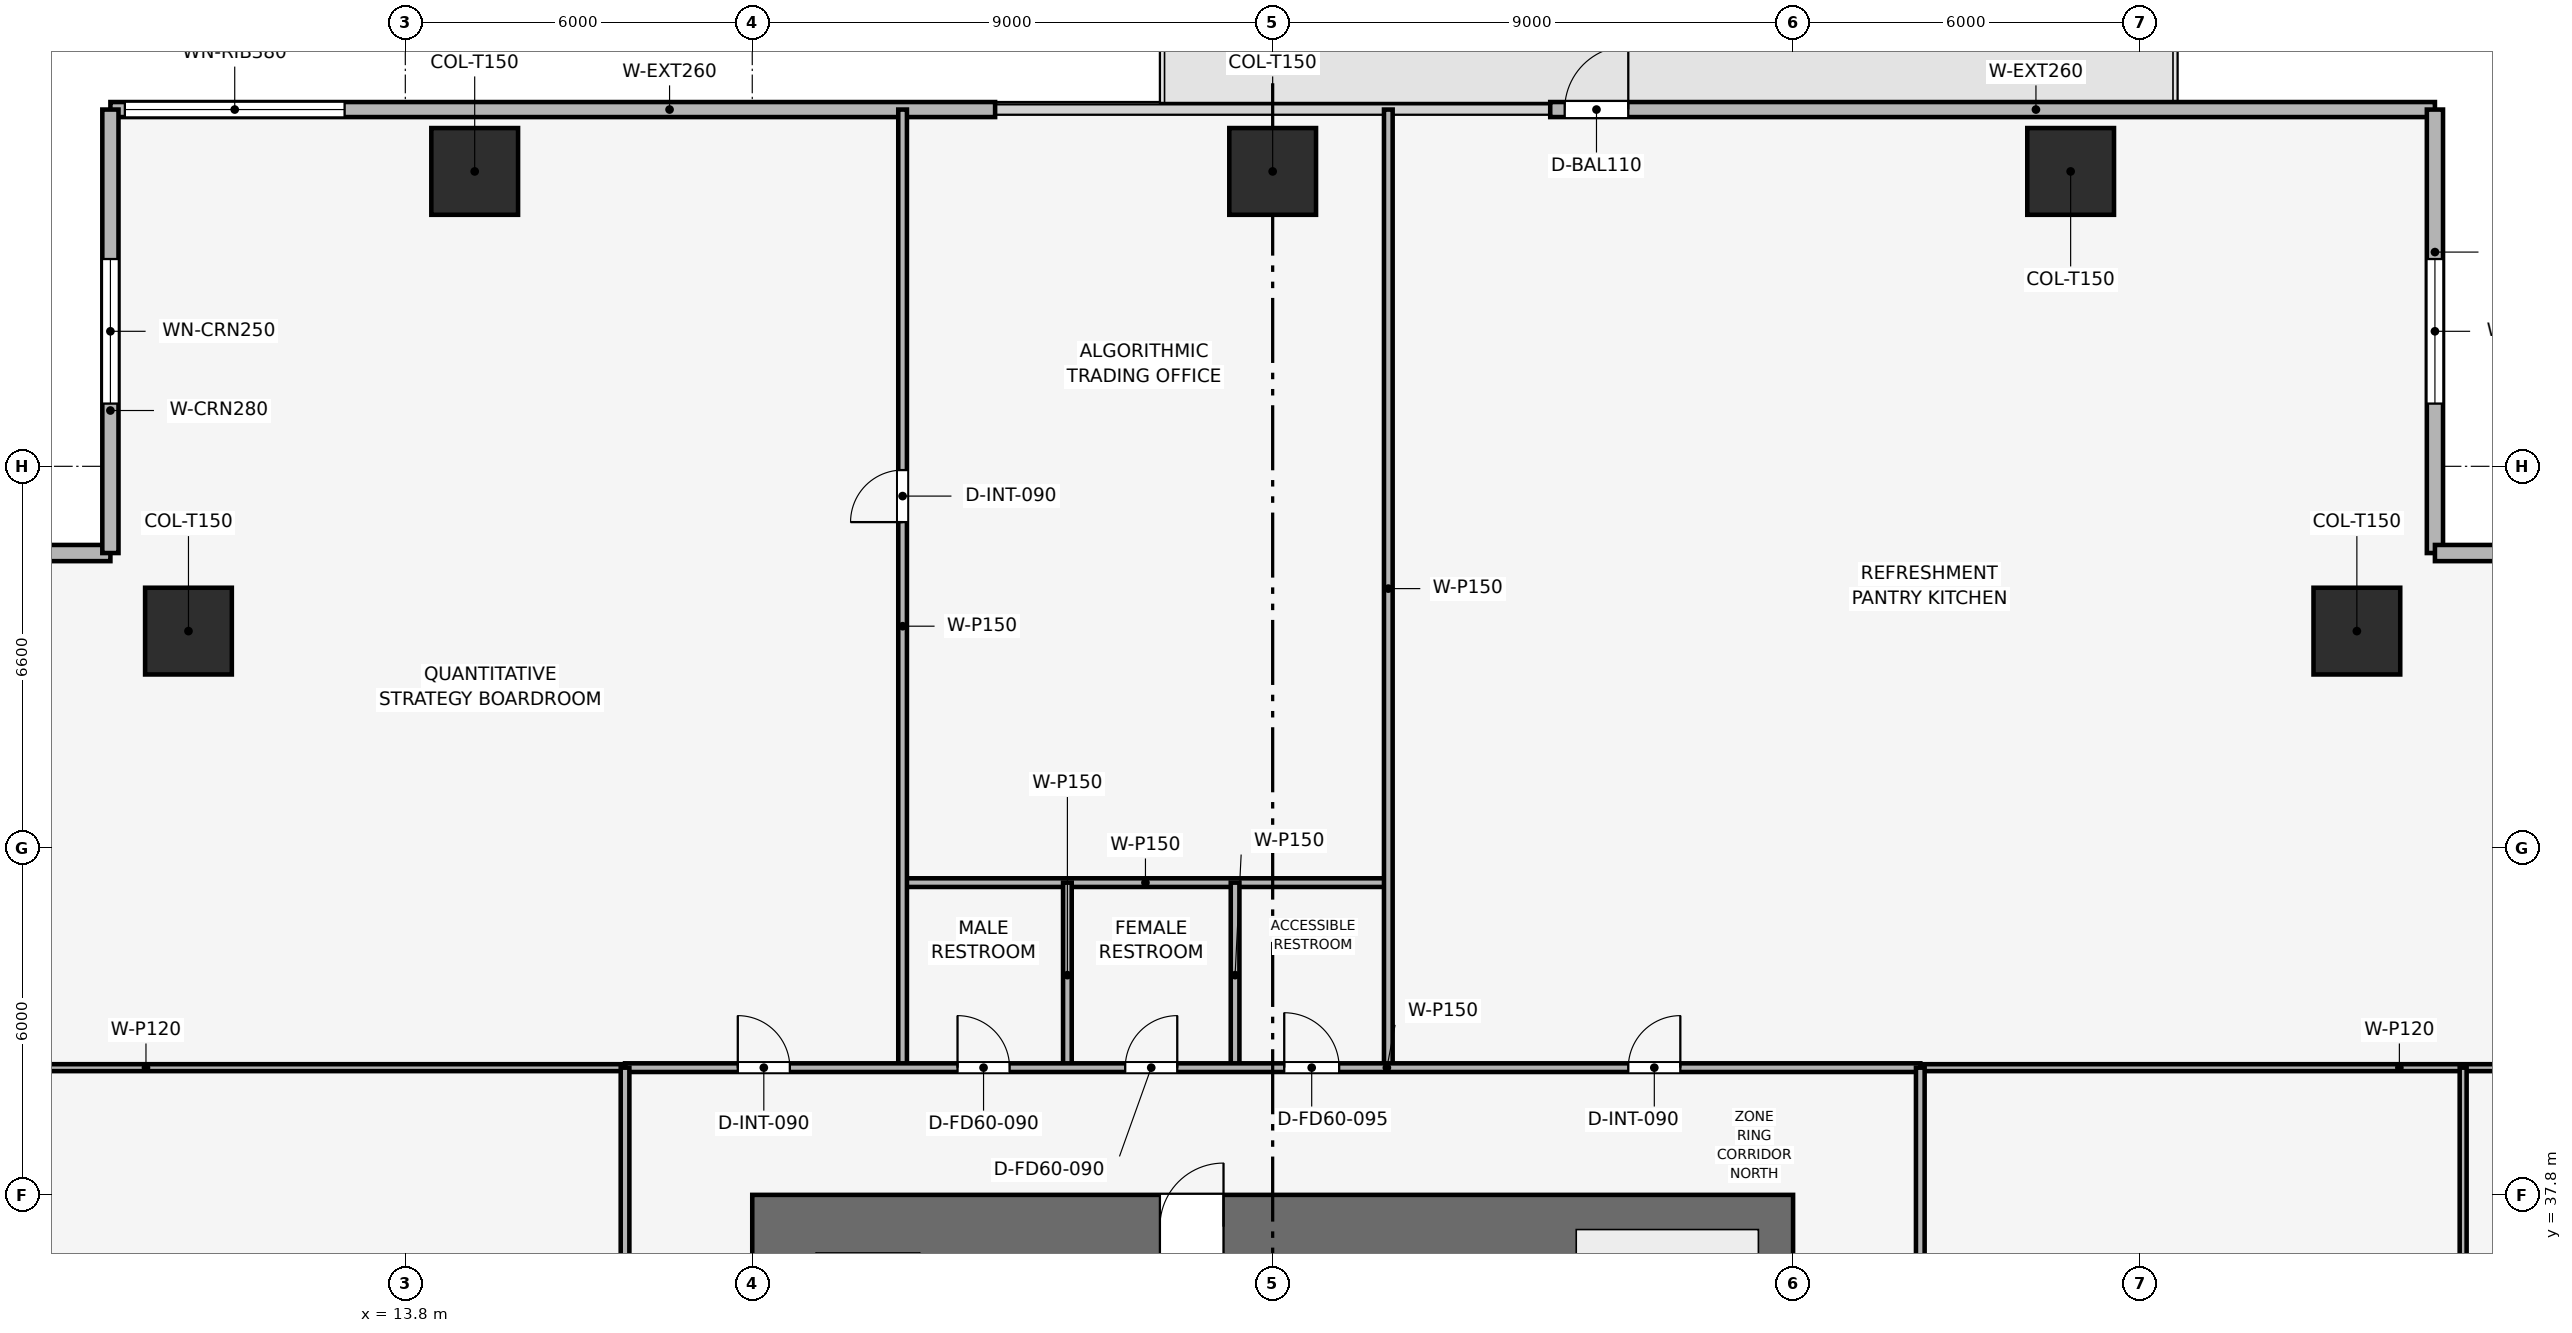
"""IFC4 building model, lengths in metres.
Left out: names, types, materials, properties, quantities, classifications, styles, units other than length and angle.
Written with IfcOpenShell. Run it as: python <this file> out.ifc"""

import sys

from ifc_helpers import new_model, si_unit, direction, frame, frame_2d, origin, origin_2d, place, context, subcontext, project, spatial, rectangle, extrude, element, fill, save


model = new_model("IFC4")
c1 = context("Model", 3, precision=1e-05, world=origin(), true_north=direction((0.0, 1.0)))
c2 = subcontext(c1, "Body", "Model", "MODEL_VIEW")
j1 = project(units=[si_unit("LENGTHUNIT", "METRE"), si_unit("PLANEANGLEUNIT", "RADIAN")], contexts=[c1])
p1 = place(None, origin())
s1 = spatial("IfcSite", under=j1, at=p1, CompositionType="ELEMENT")
p2 = place(p1, origin())
s2 = spatial("IfcBuilding", under=s1, at=p2, CompositionType="ELEMENT")
p3 = place(p2, frame((0.0, 0.0, 41.7)))
s3 = spatial("IfcBuildingStorey", under=s2, at=p3, CompositionType="ELEMENT", Elevation=41.7)
p4 = place(p3, frame((19.8, 37.25, 0.0), z_axis=(0.0, 0.0, 1.0), x_axis=(1.0, 0.0, 0.0)))
e1 = element("IfcWall", 1, at=p4, inside=s3, PredefinedType="SHEAR", context=c2, shape_type="SweptSolid", body=[
    extrude(rectangle(XDim=18.0, YDim=1.1, at=frame_2d((9.0, 0.0))), origin(), (0.0, 0.0, 1.0), 3.9),
])
p5 = place(p4, frame((7.05, 0.0, 0.0)))
e2 = element("IfcOpeningElement", 2, at=p5, cuts=e1, PredefinedType="OPENING", context=c2, shape_type="SweptSolid", body=[
    extrude(rectangle(XDim=1.1, YDim=2.15, at=frame_2d((0.55, 1.075))), frame((0.0, 0.56, 0.0), z_axis=(0.0, -1.0, 0.0), x_axis=(1.0, 0.0, 0.0)), (0.0, 0.0, 1.0), 1.12),
])
for number, where, z_axis, x_axis in (
    (3, (42.6, 55.5, 0.003), (0.0, 0.0, 1.0), (1.0, 0.0, 0.0)),
    (4, (28.8, 55.5, 0.003), (0.0, 0.0, 1.0), (1.0, 0.0, 0.0)),
    (5, (15.0, 55.5, 0.003), (0.0, 0.0, 1.0), (1.0, 0.0, 0.0)),
    (6, (47.55, 47.55, 0.003), (0.0, 0.0, 1.0), (1.0, 0.0, 0.0)),
    (7, (10.05, 47.55, 0.003), (0.0, 0.0, 1.0), (1.0, 0.0, 0.0)),
):
    element("IfcColumn", number, at=place(p3, frame(where, z_axis=z_axis, x_axis=x_axis)), inside=s3, PredefinedType="COLUMN", context=c2, shape_type="SweptSolid", body=[
        extrude(rectangle(XDim=1.5, YDim=1.5, at=origin_2d()), origin(), (0.0, 0.0, 1.0), 3.644),
    ])
p6 = place(p3, frame((8.7, 56.57, 0.0), z_axis=(0.0, 0.0, 1.0), x_axis=(1.0, 0.0, 0.0)))
e8 = element("IfcWall", 8, at=p6, inside=s3, PredefinedType="SOLIDWALL", context=c2, shape_type="SweptSolid", body=[
    extrude(rectangle(XDim=15.3, YDim=0.26, at=frame_2d((7.65, 0.0))), origin(), (0.0, 0.0, 1.0), 3.65),
])
p7 = place(p6, frame((0.25, 0.0, 0.9)))
e9 = element("IfcOpeningElement", 9, at=p7, cuts=e8, PredefinedType="OPENING", context=c2, shape_type="SweptSolid", body=[
    extrude(rectangle(XDim=3.8, YDim=1.9, at=frame_2d((1.9, 0.95))), frame((0.0, 0.14, 0.0), z_axis=(0.0, -1.0, 0.0), x_axis=(1.0, 0.0, 0.0)), (0.0, 0.0, 1.0), 0.28),
])
p8 = place(p3, frame((33.6, 56.57, 0.0), z_axis=(0.0, 0.0, 1.0), x_axis=(1.0, 0.0, 0.0)))
e10 = element("IfcWall", 10, at=p8, inside=s3, PredefinedType="SOLIDWALL", context=c2, shape_type="SweptSolid", body=[
    extrude(rectangle(XDim=15.3, YDim=0.26, at=frame_2d((7.65, 0.0))), origin(), (0.0, 0.0, 1.0), 3.65),
])
p9 = place(p8, frame((0.25, 0.0, 0.0)))
e11 = element("IfcOpeningElement", 11, at=p9, cuts=e10, PredefinedType="OPENING", context=c2, shape_type="SweptSolid", body=[
    extrude(rectangle(XDim=1.1, YDim=2.2, at=frame_2d((0.55, 1.1))), frame((0.0, 0.14, 0.0), z_axis=(0.0, -1.0, 0.0), x_axis=(1.0, 0.0, 0.0)), (0.0, 0.0, 1.0), 0.28),
])
p10 = place(p3, frame((1.03, 48.9, 0.0), z_axis=(0.0, 0.0, 1.0), x_axis=(1.0, 0.0, 0.0)))
e12 = element("IfcWall", 12, at=p10, inside=s3, PredefinedType="SOLIDWALL", context=c2, shape_type="SweptSolid", body=[
    extrude(rectangle(XDim=7.67, YDim=0.28, at=frame_2d((3.835, 0.0))), origin(), (0.0, 0.0, 1.0), 3.65),
])
p11 = place(p10, frame((2.585, 0.0, 0.9)))
e13 = element("IfcOpeningElement", 13, at=p11, cuts=e12, PredefinedType="OPENING", context=c2, shape_type="SweptSolid", body=[
    extrude(rectangle(XDim=2.5, YDim=1.9, at=frame_2d((1.25, 0.95))), frame((0.0, 0.15, 0.0), z_axis=(0.0, -1.0, 0.0), x_axis=(1.0, 0.0, 0.0)), (0.0, 0.0, 1.0), 0.3),
])
p12 = place(p3, frame((8.7, 48.9, 0.0), z_axis=(0.0, 0.0, 1.0), x_axis=(0.0, 1.0, 0.0)))
e14 = element("IfcWall", 14, at=p12, inside=s3, PredefinedType="SOLIDWALL", context=c2, shape_type="SweptSolid", body=[
    extrude(rectangle(XDim=7.67, YDim=0.28, at=frame_2d((3.835, 0.0))), origin(), (0.0, 0.0, 1.0), 3.65),
])
p13 = place(p12, frame((2.585, 0.0, 0.9)))
e15 = element("IfcOpeningElement", 15, at=p13, cuts=e14, PredefinedType="OPENING", context=c2, shape_type="SweptSolid", body=[
    extrude(rectangle(XDim=2.5, YDim=1.9, at=frame_2d((1.25, 0.95))), frame((0.0, 0.15, 0.0), z_axis=(0.0, -1.0, 0.0), x_axis=(1.0, 0.0, 0.0)), (0.0, 0.0, 1.0), 0.3),
])
p14 = place(p3, frame((48.9, 56.57, 0.0), z_axis=(0.0, 0.0, 1.0), x_axis=(0.0, -1.0, 0.0)))
e16 = element("IfcWall", 16, at=p14, inside=s3, PredefinedType="SOLIDWALL", context=c2, shape_type="SweptSolid", body=[
    extrude(rectangle(XDim=7.67, YDim=0.28, at=frame_2d((3.835, 0.0))), origin(), (0.0, 0.0, 1.0), 3.65),
])
p15 = place(p14, frame((2.585, 0.0, 0.9)))
e17 = element("IfcOpeningElement", 17, at=p15, cuts=e16, PredefinedType="OPENING", context=c2, shape_type="SweptSolid", body=[
    extrude(rectangle(XDim=2.5, YDim=1.9, at=frame_2d((1.25, 0.95))), frame((0.0, 0.15, 0.0), z_axis=(0.0, -1.0, 0.0), x_axis=(1.0, 0.0, 0.0)), (0.0, 0.0, 1.0), 0.3),
])
p16 = place(p3, frame((48.9, 48.9, 0.0), z_axis=(0.0, 0.0, 1.0), x_axis=(1.0, 0.0, 0.0)))
e18 = element("IfcWall", 18, at=p16, inside=s3, PredefinedType="SOLIDWALL", context=c2, shape_type="SweptSolid", body=[
    extrude(rectangle(XDim=7.67, YDim=0.28, at=frame_2d((3.835, 0.0))), origin(), (0.0, 0.0, 1.0), 3.65),
])
p17 = place(p16, frame((2.585, 0.0, 0.9)))
e19 = element("IfcOpeningElement", 19, at=p17, cuts=e18, PredefinedType="OPENING", context=c2, shape_type="SweptSolid", body=[
    extrude(rectangle(XDim=2.5, YDim=1.9, at=frame_2d((1.25, 0.95))), frame((0.0, 0.15, 0.0), z_axis=(0.0, -1.0, 0.0), x_axis=(1.0, 0.0, 0.0)), (0.0, 0.0, 1.0), 0.3),
])
p18 = place(p3, frame((22.4, 43.2, 0.0), z_axis=(0.0, 0.0, 1.0), x_axis=(1.0, 0.0, 0.0)))
e20 = element("IfcWall", 20, at=p18, inside=s3, PredefinedType="PARTITIONING", context=c2, shape_type="SweptSolid", body=[
    extrude(rectangle(XDim=8.4, YDim=0.15, at=frame_2d((4.2, 0.0))), origin(), (0.0, 0.0, 1.0), 3.085),
])
p19 = place(p3, frame((22.4, 40.0, 0.0), z_axis=(0.0, 0.0, 1.0), x_axis=(0.0, 1.0, 0.0)))
e21 = element("IfcWall", 21, at=p19, inside=s3, PredefinedType="PARTITIONING", context=c2, shape_type="SweptSolid", body=[
    extrude(rectangle(XDim=16.57, YDim=0.15, at=frame_2d((8.285, 0.0))), origin(), (0.0, 0.0, 1.0), 2.935),
])
p20 = place(p19, frame((9.435, 0.0, 0.0)))
e22 = element("IfcOpeningElement", 22, at=p20, cuts=e21, PredefinedType="OPENING", context=c2, shape_type="SweptSolid", body=[
    extrude(rectangle(XDim=0.9, YDim=2.1, at=frame_2d((0.45, 1.05))), frame((0.0, 0.085, 0.0), z_axis=(0.0, -1.0, 0.0), x_axis=(1.0, 0.0, 0.0)), (0.0, 0.0, 1.0), 0.17),
])
p21 = place(p3, frame((30.8, 40.0, 0.0), z_axis=(0.0, 0.0, 1.0), x_axis=(0.0, 1.0, 0.0)))
e23 = element("IfcWall", 23, at=p21, inside=s3, PredefinedType="PARTITIONING", context=c2, shape_type="SweptSolid", body=[
    extrude(rectangle(XDim=16.57, YDim=0.15, at=frame_2d((8.285, 0.0))), origin(), (0.0, 0.0, 1.0), 2.935),
])
for number, where, z_axis, x_axis in (
    (24, (25.25, 40.0, 0.0), (0.0, 0.0, 1.0), (0.0, 1.0, 0.0)),
    (25, (28.15, 40.0, 0.0), (0.0, 0.0, 1.0), (0.0, 1.0, 0.0)),
):
    element("IfcWall", number, at=place(p3, frame(where, z_axis=z_axis, x_axis=x_axis)), inside=s3, PredefinedType="PARTITIONING", context=c2, shape_type="SweptSolid", body=[
        extrude(rectangle(XDim=3.2, YDim=0.15, at=frame_2d((1.6, 0.0))), origin(), (0.0, 0.0, 1.0), 3.65),
    ])
for number, where, z_axis, x_axis in (
    (26, (1.03, 40.0, 0.0), (0.0, 0.0, 1.0), (1.0, 0.0, 0.0)),
    (27, (40.0, 40.0, 0.0), (0.0, 0.0, 1.0), (1.0, 0.0, 0.0)),
):
    element("IfcWall", number, at=place(p3, frame(where, z_axis=z_axis, x_axis=x_axis)), inside=s3, PredefinedType="PARTITIONING", context=c2, shape_type="SweptSolid", body=[
        extrude(rectangle(XDim=16.57, YDim=0.12, at=frame_2d((8.285, 0.0))), origin(), (0.0, 0.0, 1.0), 2.935),
    ])
p22 = place(p3, frame((49.388, 23.638, 0.0), z_axis=(0.0, 0.0, 1.0), x_axis=(0.0, 1.0, 0.0)))
e28 = element("IfcWall", 28, at=p22, inside=s3, PredefinedType="PARTITIONING", context=c2, shape_type="SweptSolid", body=[
    extrude(rectangle(XDim=16.362, YDim=0.12, at=frame_2d((8.181, 0.0))), origin(), (0.0, 0.0, 1.0), 3.085),
])
p23 = place(p22, frame((11.496, 0.0, 0.0)))
e29 = element("IfcOpeningElement", 29, at=p23, cuts=e28, PredefinedType="OPENING", context=c2, shape_type="SweptSolid", body=[
    extrude(rectangle(XDim=0.9, YDim=2.1, at=frame_2d((0.45, 1.05))), frame((0.0, 0.07, 0.0), z_axis=(0.0, -1.0, 0.0), x_axis=(1.0, 0.0, 0.0)), (0.0, 0.0, 1.0), 0.14),
])
p24 = place(p3, frame((17.6, 40.0, 0.0), z_axis=(0.0, 0.0, 1.0), x_axis=(1.0, 0.0, 0.0)))
e30 = element("IfcWall", 30, at=p24, inside=s3, PredefinedType="PARTITIONING", context=c2, shape_type="SweptSolid", body=[
    extrude(rectangle(XDim=22.4, YDim=0.15, at=frame_2d((11.2, 0.0))), origin(), (0.0, 0.0, 1.0), 3.085),
])
p25 = place(p24, frame((1.95, 0.0, 0.0)))
e31 = element("IfcOpeningElement", 31, at=p25, cuts=e30, PredefinedType="OPENING", context=c2, shape_type="SweptSolid", body=[
    extrude(rectangle(XDim=0.9, YDim=2.1, at=frame_2d((0.45, 1.05))), frame((0.0, 0.085, 0.0), z_axis=(0.0, -1.0, 0.0), x_axis=(1.0, 0.0, 0.0)), (0.0, 0.0, 1.0), 0.17),
])
p26 = place(p24, frame((5.75, 0.0, 0.0)))
e32 = element("IfcOpeningElement", 32, at=p26, cuts=e30, PredefinedType="OPENING", context=c2, shape_type="SweptSolid", body=[
    extrude(rectangle(XDim=0.9, YDim=2.1, at=frame_2d((0.45, 1.05))), frame((0.0, 0.085, 0.0), z_axis=(0.0, -1.0, 0.0), x_axis=(1.0, 0.0, 0.0)), (0.0, 0.0, 1.0), 0.17),
])
p27 = place(p24, frame((8.65, 0.0, 0.0)))
e33 = element("IfcOpeningElement", 33, at=p27, cuts=e30, PredefinedType="OPENING", context=c2, shape_type="SweptSolid", body=[
    extrude(rectangle(XDim=0.9, YDim=2.1, at=frame_2d((0.45, 1.05))), frame((0.0, 0.085, 0.0), z_axis=(0.0, -1.0, 0.0), x_axis=(1.0, 0.0, 0.0)), (0.0, 0.0, 1.0), 0.17),
])
p28 = place(p24, frame((11.4, 0.0, 0.0)))
e34 = element("IfcOpeningElement", 34, at=p28, cuts=e30, PredefinedType="OPENING", context=c2, shape_type="SweptSolid", body=[
    extrude(rectangle(XDim=0.95, YDim=2.1, at=frame_2d((0.475, 1.05))), frame((0.0, 0.085, 0.0), z_axis=(0.0, -1.0, 0.0), x_axis=(1.0, 0.0, 0.0)), (0.0, 0.0, 1.0), 0.17),
])
p29 = place(p24, frame((17.35, 0.0, 0.0)))
e35 = element("IfcOpeningElement", 35, at=p29, cuts=e30, PredefinedType="OPENING", context=c2, shape_type="SweptSolid", body=[
    extrude(rectangle(XDim=0.9, YDim=2.1, at=frame_2d((0.45, 1.05))), frame((0.0, 0.085, 0.0), z_axis=(0.0, -1.0, 0.0), x_axis=(1.0, 0.0, 0.0)), (0.0, 0.0, 1.0), 0.17),
])
p30 = place(p3, frame((17.6, 17.6, 0.0), z_axis=(0.0, 0.0, 1.0), x_axis=(0.0, 1.0, 0.0)))
e36 = element("IfcWall", 36, at=p30, inside=s3, PredefinedType="PARTITIONING", context=c2, shape_type="SweptSolid", body=[
    extrude(rectangle(XDim=22.4, YDim=0.15, at=frame_2d((11.2, 0.0))), origin(), (0.0, 0.0, 1.0), 3.085),
])
p31 = place(p30, frame((10.75, 0.0, 0.0)))
e37 = element("IfcOpeningElement", 37, at=p31, cuts=e36, PredefinedType="OPENING", context=c2, shape_type="SweptSolid", body=[
    extrude(rectangle(XDim=0.9, YDim=2.1, at=frame_2d((0.45, 1.05))), frame((0.0, 0.085, 0.0), z_axis=(0.0, -1.0, 0.0), x_axis=(1.0, 0.0, 0.0)), (0.0, 0.0, 1.0), 0.17),
])
p32 = place(p3, frame((40.0, 17.6, 0.0), z_axis=(0.0, 0.0, 1.0), x_axis=(0.0, 1.0, 0.0)))
e38 = element("IfcWall", 38, at=p32, inside=s3, PredefinedType="PARTITIONING", context=c2, shape_type="SweptSolid", body=[
    extrude(rectangle(XDim=22.4, YDim=0.15, at=frame_2d((11.2, 0.0))), origin(), (0.0, 0.0, 1.0), 3.085),
])
p33 = place(p32, frame((2.569, 0.0, 0.0)))
e39 = element("IfcOpeningElement", 39, at=p33, cuts=e38, PredefinedType="OPENING", context=c2, shape_type="SweptSolid", body=[
    extrude(rectangle(XDim=0.9, YDim=2.1, at=frame_2d((0.45, 1.05))), frame((0.0, 0.085, 0.0), z_axis=(0.0, -1.0, 0.0), x_axis=(1.0, 0.0, 0.0)), (0.0, 0.0, 1.0), 0.17),
])
p34 = place(p32, frame((13.769, 0.0, 0.0)))
e40 = element("IfcOpeningElement", 40, at=p34, cuts=e38, PredefinedType="OPENING", context=c2, shape_type="SweptSolid", body=[
    extrude(rectangle(XDim=0.9, YDim=2.1, at=frame_2d((0.45, 1.05))), frame((0.0, 0.085, 0.0), z_axis=(0.0, -1.0, 0.0), x_axis=(1.0, 0.0, 0.0)), (0.0, 0.0, 1.0), 0.17),
])
p35 = place(p9, origin())
e41 = element("IfcDoor", 41, at=p35, inside=s3, OperationType="SINGLE_SWING_RIGHT", PredefinedType="DOOR", context=c2, shape_type="SweptSolid", body=[
    extrude(rectangle(XDim=1.1, YDim=2.2, at=frame_2d((0.55, 1.1))), frame((0.0, 0.025, 0.0), z_axis=(0.0, -1.0, 0.0), x_axis=(1.0, 0.0, 0.0)), (0.0, 0.0, 1.0), 0.05),
])
fill(e11, e41)
p36 = place(p7, origin())
e42 = element("IfcWindow", 42, at=p36, inside=s3, PartitioningType="SINGLE_PANEL", PredefinedType="WINDOW", context=c2, shape_type="SweptSolid", body=[
    extrude(rectangle(XDim=3.8, YDim=1.9, at=frame_2d((1.9, 0.95))), frame((0.0, 0.03, 0.0), z_axis=(0.0, -1.0, 0.0), x_axis=(1.0, 0.0, 0.0)), (0.0, 0.0, 1.0), 0.06),
])
fill(e9, e42)
p37 = place(p13, origin())
e43 = element("IfcWindow", 43, at=p37, inside=s3, PartitioningType="SINGLE_PANEL", PredefinedType="WINDOW", context=c2, shape_type="SweptSolid", body=[
    extrude(rectangle(XDim=2.5, YDim=1.9, at=frame_2d((1.25, 0.95))), frame((0.0, 0.03, 0.0), z_axis=(0.0, -1.0, 0.0), x_axis=(1.0, 0.0, 0.0)), (0.0, 0.0, 1.0), 0.06),
])
fill(e15, e43)
p38 = place(p15, origin())
e44 = element("IfcWindow", 44, at=p38, inside=s3, PartitioningType="SINGLE_PANEL", PredefinedType="WINDOW", context=c2, shape_type="SweptSolid", body=[
    extrude(rectangle(XDim=2.5, YDim=1.9, at=frame_2d((1.25, 0.95))), frame((0.0, 0.03, 0.0), z_axis=(0.0, -1.0, 0.0), x_axis=(1.0, 0.0, 0.0)), (0.0, 0.0, 1.0), 0.06),
])
fill(e17, e44)
p39 = place(p20, origin())
e45 = element("IfcDoor", 45, at=p39, inside=s3, OperationType="SINGLE_SWING_LEFT", PredefinedType="DOOR", context=c2, shape_type="SweptSolid", body=[
    extrude(rectangle(XDim=0.9, YDim=2.1, at=frame_2d((0.45, 1.05))), frame((0.0, 0.025, 0.0), z_axis=(0.0, -1.0, 0.0), x_axis=(1.0, 0.0, 0.0)), (0.0, 0.0, 1.0), 0.05),
])
fill(e22, e45)
p40 = place(p25, origin())
e46 = element("IfcDoor", 46, at=p40, inside=s3, OperationType="SINGLE_SWING_LEFT", PredefinedType="DOOR", context=c2, shape_type="SweptSolid", body=[
    extrude(rectangle(XDim=0.9, YDim=2.1, at=frame_2d((0.45, 1.05))), frame((0.0, 0.025, 0.0), z_axis=(0.0, -1.0, 0.0), x_axis=(1.0, 0.0, 0.0)), (0.0, 0.0, 1.0), 0.05),
])
fill(e31, e46)
p41 = place(p26, origin())
e47 = element("IfcDoor", 47, at=p41, inside=s3, OperationType="SINGLE_SWING_LEFT", PredefinedType="DOOR", context=c2, shape_type="SweptSolid", body=[
    extrude(rectangle(XDim=0.9, YDim=2.1, at=frame_2d((0.45, 1.05))), frame((0.0, 0.025, 0.0), z_axis=(0.0, -1.0, 0.0), x_axis=(1.0, 0.0, 0.0)), (0.0, 0.0, 1.0), 0.05),
])
fill(e32, e47)
p42 = place(p27, origin())
e48 = element("IfcDoor", 48, at=p42, inside=s3, OperationType="SINGLE_SWING_RIGHT", PredefinedType="DOOR", context=c2, shape_type="SweptSolid", body=[
    extrude(rectangle(XDim=0.9, YDim=2.1, at=frame_2d((0.45, 1.05))), frame((0.0, 0.025, 0.0), z_axis=(0.0, -1.0, 0.0), x_axis=(1.0, 0.0, 0.0)), (0.0, 0.0, 1.0), 0.05),
])
fill(e33, e48)
p43 = place(p28, origin())
e49 = element("IfcDoor", 49, at=p43, inside=s3, OperationType="SINGLE_SWING_LEFT", PredefinedType="DOOR", context=c2, shape_type="SweptSolid", body=[
    extrude(rectangle(XDim=0.95, YDim=2.1, at=frame_2d((0.475, 1.05))), frame((0.0, 0.025, 0.0), z_axis=(0.0, -1.0, 0.0), x_axis=(1.0, 0.0, 0.0)), (0.0, 0.0, 1.0), 0.05),
])
fill(e34, e49)
p44 = place(p29, origin())
e50 = element("IfcDoor", 50, at=p44, inside=s3, OperationType="SINGLE_SWING_RIGHT", PredefinedType="DOOR", context=c2, shape_type="SweptSolid", body=[
    extrude(rectangle(XDim=0.9, YDim=2.1, at=frame_2d((0.45, 1.05))), frame((0.0, 0.025, 0.0), z_axis=(0.0, -1.0, 0.0), x_axis=(1.0, 0.0, 0.0)), (0.0, 0.0, 1.0), 0.05),
])
fill(e35, e50)
p45 = place(p5, origin())
e51 = element("IfcDoor", 51, at=p45, inside=s3, OperationType="SINGLE_SWING_RIGHT", PredefinedType="DOOR", context=c2, shape_type="SweptSolid", body=[
    extrude(rectangle(XDim=1.1, YDim=2.15, at=frame_2d((0.55, 1.075))), frame((0.0, 0.025, 0.0), z_axis=(0.0, -1.0, 0.0), x_axis=(1.0, 0.0, 0.0)), (0.0, 0.0, 1.0), 0.05),
])
fill(e2, e51)
save(model, sys.argv[1])
